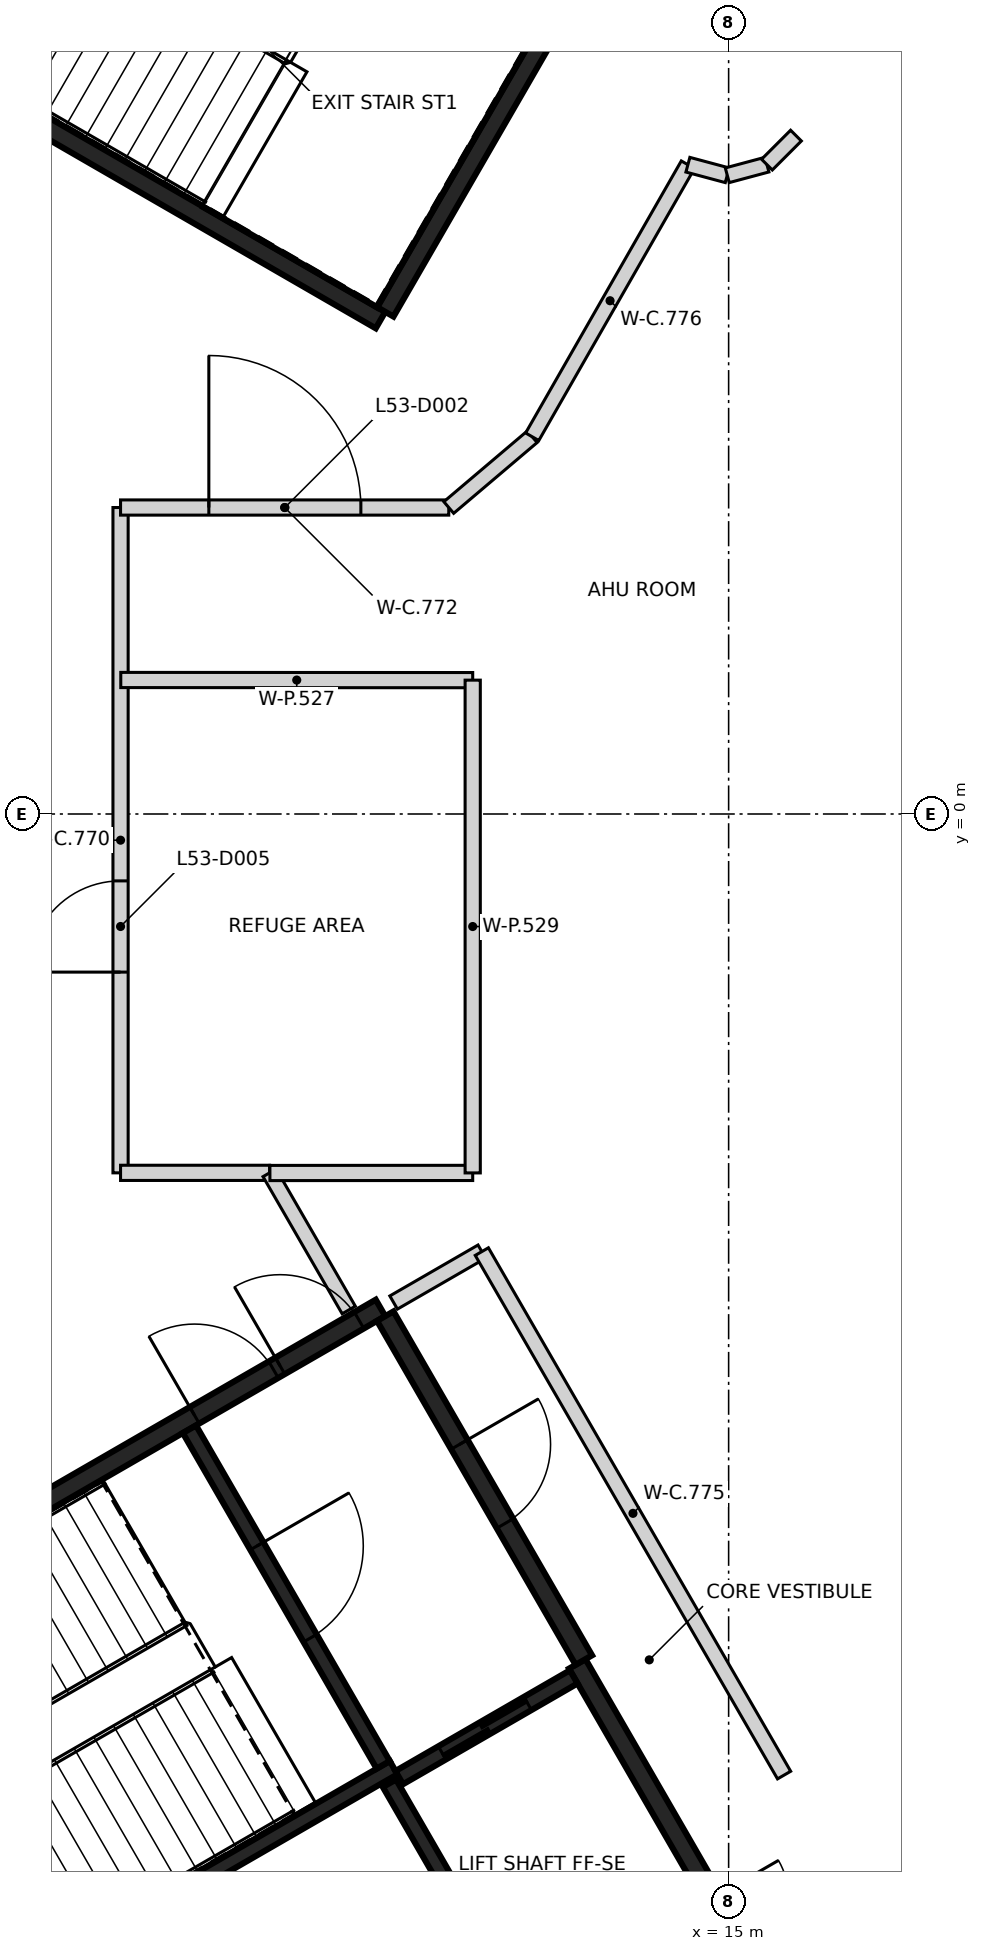
"""IFC4 building model, lengths in metres.
Left out: names, types, materials, properties, quantities, classifications, styles, units other than length and angle.
Written with IfcOpenShell. Run it as: python <this file> out.ifc"""

import sys

from ifc_helpers import new_model, si_unit, direction, frame, frame_2d, origin, place, context, subcontext, project, spatial, rectangle, extrude, element, fill, save


model = new_model("IFC4")
c1 = context("Model", 3, precision=1e-05, world=origin(), true_north=direction((0.0, 1.0)))
c2 = subcontext(c1, "Body", "Model", "MODEL_VIEW")
j1 = project(units=[si_unit("LENGTHUNIT", "METRE"), si_unit("PLANEANGLEUNIT", "RADIAN")], contexts=[c1])
p1 = place(None, origin())
s1 = spatial("IfcSite", under=j1, at=p1, CompositionType="ELEMENT")
p2 = place(p1, origin())
s2 = spatial("IfcBuilding", under=s1, at=p2, CompositionType="ELEMENT")
p3 = place(p2, frame((0.0, 0.0, 211.6)))
s3 = spatial("IfcBuildingStorey", under=s2, at=p3, CompositionType="ELEMENT", Elevation=211.6)
p4 = place(p3, frame((10.42, 6.498, 0.0), z_axis=(0.0, 0.0, 1.0), x_axis=(-0.866021906294, 0.500006057782, 0.0)))
e1 = element("IfcWall", 1, at=p4, inside=s3, PredefinedType="SHEAR", context=c2, shape_type="SweptSolid", body=[
    extrude(rectangle(XDim=11.55, YDim=0.25, at=frame_2d((5.775, 0.0))), origin(), (0.0, 0.0, 1.0), 4.45),
])
p5 = place(p4, frame((10.025, 0.0, 0.0)))
e2 = element("IfcOpeningElement", 2, at=p5, cuts=e1, PredefinedType="OPENING", context=c2, shape_type="SweptSolid", body=[
    extrude(rectangle(XDim=1.2, YDim=2.1, at=frame_2d((0.6, 1.05))), frame((0.0, 0.135, 0.0), z_axis=(0.0, -1.0, 0.0), x_axis=(1.0, 0.0, 0.0)), (0.0, 0.0, 1.0), 0.27),
])
p6 = place(p4, frame((8.725, 0.0, 0.0)))
e3 = element("IfcOpeningElement", 3, at=p6, cuts=e1, PredefinedType="OPENING", context=c2, shape_type="SweptSolid", body=[
    extrude(rectangle(XDim=1.2, YDim=2.1, at=frame_2d((0.6, 1.05))), frame((0.0, 0.135, 0.0), z_axis=(0.0, -1.0, 0.0), x_axis=(1.0, 0.0, 0.0)), (0.0, 0.0, 1.0), 0.27),
])
p7 = place(p3, frame((13.238, 11.378, 0.0), z_axis=(0.0, 0.0, 1.0), x_axis=(-0.500008851346, -0.866020293397, 0.0)))
e4 = element("IfcWall", 4, at=p7, inside=s3, PredefinedType="SHEAR", context=c2, shape_type="SweptSolid", body=[
    extrude(rectangle(XDim=5.51, YDim=0.25, at=frame_2d((2.755, 0.0))), origin(), (0.0, 0.0, 1.0), 4.45),
])
p8 = place(p3, frame((0.417, -12.273, 0.0), z_axis=(0.0, 0.0, 1.0), x_axis=(0.866021906294, 0.500006057782, 0.0)))
e5 = element("IfcWall", 5, at=p8, inside=s3, PredefinedType="SHEAR", context=c2, shape_type="SweptSolid", body=[
    extrude(rectangle(XDim=11.55, YDim=0.25, at=frame_2d((5.775, 0.0))), origin(), (0.0, 0.0, 1.0), 4.45),
])
p9 = place(p8, frame((10.025, 0.0, 0.0)))
e6 = element("IfcOpeningElement", 6, at=p9, cuts=e5, PredefinedType="OPENING", context=c2, shape_type="SweptSolid", body=[
    extrude(rectangle(XDim=1.2, YDim=2.1, at=frame_2d((0.6, 1.05))), frame((0.0, 0.135, 0.0), z_axis=(0.0, -1.0, 0.0), x_axis=(1.0, 0.0, 0.0)), (0.0, 0.0, 1.0), 0.27),
])
p10 = place(p8, frame((8.725, 0.0, 0.0)))
e7 = element("IfcOpeningElement", 7, at=p10, cuts=e5, PredefinedType="OPENING", context=c2, shape_type="SweptSolid", body=[
    extrude(rectangle(XDim=1.2, YDim=2.1, at=frame_2d((0.6, 1.05))), frame((0.0, 0.135, 0.0), z_axis=(0.0, -1.0, 0.0), x_axis=(1.0, 0.0, 0.0)), (0.0, 0.0, 1.0), 0.27),
])
p11 = place(p3, frame((13.008, -11.181, 0.0), z_axis=(0.0, 0.0, 1.0), x_axis=(0.500001955336, -0.866024274868, 0.0)))
e8 = element("IfcWall", 8, at=p11, inside=s3, PredefinedType="SHEAR", context=c2, shape_type="SweptSolid", body=[
    extrude(rectangle(XDim=6.125, YDim=0.25, at=frame_2d((3.062, 0.0))), origin(), (0.0, 0.0, 1.0), 4.45),
])
p12 = place(p11, frame((3.563, 0.0, 0.0)))
e9 = element("IfcOpeningElement", 9, at=p12, cuts=e8, PredefinedType="OPENING", context=c2, shape_type="SweptSolid", body=[
    extrude(rectangle(XDim=1.0, YDim=2.1, at=frame_2d((0.5, 1.05))), frame((0.0, 0.135, 0.0), z_axis=(0.0, -1.0, 0.0), x_axis=(1.0, 0.0, 0.0)), (0.0, 0.0, 1.0), 0.27),
])
p13 = place(p3, frame((10.483, -6.606, 0.0), z_axis=(0.0, 0.0, 1.0), x_axis=(0.49999885962, -0.866026062182, 0.0)))
e10 = element("IfcWall", 10, at=p13, inside=s3, PredefinedType="SHEAR", context=c2, shape_type="SweptSolid", body=[
    extrude(rectangle(XDim=5.225, YDim=0.25, at=frame_2d((2.612, 0.0))), origin(), (0.0, 0.0, 1.0), 4.45),
])
p14 = place(p13, frame((1.95, 0.0, 0.0)))
e11 = element("IfcOpeningElement", 11, at=p14, cuts=e10, PredefinedType="OPENING", context=c2, shape_type="SweptSolid", body=[
    extrude(rectangle(XDim=1.2, YDim=2.1, at=frame_2d((0.6, 1.05))), frame((0.0, 0.135, 0.0), z_axis=(0.0, -1.0, 0.0), x_axis=(1.0, 0.0, 0.0)), (0.0, 0.0, 1.0), 0.27),
])
p15 = place(p3, frame((5.419, -15.534, 0.0), z_axis=(0.0, 0.0, 1.0), x_axis=(0.866029065029, 0.499993658486, 0.0)))
e12 = element("IfcWall", 12, at=p15, inside=s3, PredefinedType="SHEAR", context=c2, shape_type="SweptSolid", body=[
    extrude(rectangle(XDim=5.974, YDim=0.2, at=frame_2d((2.987, 0.0))), origin(), (0.0, 0.0, 1.0), 4.45),
])
p16 = place(p3, frame((7.906, -8.094, 0.0), z_axis=(0.0, 0.0, 1.0), x_axis=(0.500027839223, -0.866009330205, 0.0)))
e13 = element("IfcWall", 13, at=p16, inside=s3, PredefinedType="SHEAR", context=c2, shape_type="SweptSolid", body=[
    extrude(rectangle(XDim=5.098, YDim=0.2, at=frame_2d((2.549, 0.0))), origin(), (0.0, 0.0, 1.0), 4.45),
])
p17 = place(p16, frame((1.774, 0.0, 0.0)))
e14 = element("IfcOpeningElement", 14, at=p17, cuts=e13, PredefinedType="OPENING", context=c2, shape_type="SweptSolid", body=[
    extrude(rectangle(XDim=1.4, YDim=2.1, at=frame_2d((0.7, 1.05))), frame((0.0, 0.11, 0.0), z_axis=(0.0, -1.0, 0.0), x_axis=(1.0, 0.0, 0.0)), (0.0, 0.0, 1.0), 0.22),
])
p18 = place(p3, frame((12.088, -15.437, 0.0), z_axis=(0.0, 0.0, 1.0), x_axis=(-0.500026960575, 0.86600983753, 0.0)))
e15 = element("IfcWall", 15, at=p18, inside=s3, PredefinedType="SHEAR", context=c2, shape_type="SweptSolid", body=[
    extrude(rectangle(XDim=3.1, YDim=0.2, at=frame_2d((1.55, 0.0))), origin(), (0.0, 0.0, 1.0), 4.45),
])
p19 = place(p3, frame((10.666, -12.678, 0.0), z_axis=(0.0, 0.0, 1.0), x_axis=(0.866018407898, 0.500012117035, 0.0)))
e16 = element("IfcWall", 16, at=p19, inside=s3, PredefinedType="SHEAR", context=c2, shape_type="SweptSolid", body=[
    extrude(rectangle(XDim=2.651, YDim=0.2, at=frame_2d((1.325, 0.0))), origin(), (0.0, 0.0, 1.0), 4.45),
])
p20 = place(p19, frame((0.652, 0.0, 0.0)))
e17 = element("IfcOpeningElement", 17, at=p20, cuts=e16, PredefinedType="OPENING", context=c2, shape_type="SweptSolid", body=[
    extrude(rectangle(XDim=1.3, YDim=2.1, at=frame_2d((0.65, 1.05))), frame((0.0, 0.11, 0.0), z_axis=(0.0, -1.0, 0.0), x_axis=(1.0, 0.0, 0.0)), (0.0, 0.0, 1.0), 0.22),
])
p21 = place(p3, frame((7.0, -4.721, 0.0), z_axis=(0.0, 0.0, 1.0), x_axis=(0.0, 1.0, 0.0)))
e18 = element("IfcWall", 18, at=p21, inside=s3, PredefinedType="PARTITIONING", context=c2, shape_type="SweptSolid", body=[
    extrude(rectangle(XDim=8.753, YDim=0.2, at=frame_2d((4.376, 0.0))), origin(), (0.0, 0.0, 1.0), 4.45),
])
p22 = place(p21, frame((2.641, 0.0, 0.0)))
e19 = element("IfcOpeningElement", 19, at=p22, cuts=e18, PredefinedType="OPENING", context=c2, shape_type="SweptSolid", body=[
    extrude(rectangle(XDim=1.2, YDim=2.1, at=frame_2d((0.6, 1.05))), frame((0.0, 0.11, 0.0), z_axis=(0.0, -1.0, 0.0), x_axis=(1.0, 0.0, 0.0)), (0.0, 0.0, 1.0), 0.22),
])
p23 = place(p3, frame((7.0, -4.721, 0.0), z_axis=(0.0, 0.0, 1.0), x_axis=(1.0, 0.0, 0.0)))
e20 = element("IfcWall", 20, at=p23, inside=s3, PredefinedType="PARTITIONING", context=c2, shape_type="SweptSolid", body=[
    extrude(rectangle(XDim=1.961, YDim=0.2, at=frame_2d((0.98, 0.0))), origin(), (0.0, 0.0, 1.0), 4.45),
])
p24 = place(p3, frame((7.0, 4.032, 0.0), z_axis=(0.0, 0.0, 1.0), x_axis=(1.0, 0.0, 0.0)))
e21 = element("IfcWall", 21, at=p24, inside=s3, PredefinedType="PARTITIONING", context=c2, shape_type="SweptSolid", body=[
    extrude(rectangle(XDim=4.318, YDim=0.2, at=frame_2d((2.159, 0.0))), origin(), (0.0, 0.0, 1.0), 4.45),
])
p25 = place(p24, frame((1.162, 0.0, 0.0)))
e22 = element("IfcOpeningElement", 22, at=p25, cuts=e21, PredefinedType="OPENING", context=c2, shape_type="SweptSolid", body=[
    extrude(rectangle(XDim=2.0, YDim=2.1, at=frame_2d((1.0, 1.05))), frame((0.0, 0.11, 0.0), z_axis=(0.0, -1.0, 0.0), x_axis=(1.0, 0.0, 0.0)), (0.0, 0.0, 1.0), 0.22),
])
p26 = place(p3, frame((8.961, -4.721, 0.0), z_axis=(0.0, 0.0, 1.0), x_axis=(0.499806992981, -0.866136807766, 0.0)))
e23 = element("IfcWall", 23, at=p26, inside=s3, PredefinedType="PARTITIONING", context=c2, shape_type="SweptSolid", body=[
    extrude(rectangle(XDim=2.083, YDim=0.2, at=frame_2d((1.042, 0.0))), origin(), (0.0, 0.0, 1.0), 4.45),
])
p27 = place(p3, frame((10.593, -6.427, 0.0), z_axis=(0.0, 0.0, 1.0), x_axis=(0.865912429188, 0.500195626709, 0.0)))
e24 = element("IfcWall", 24, at=p27, inside=s3, PredefinedType="PARTITIONING", context=c2, shape_type="SweptSolid", body=[
    extrude(rectangle(XDim=1.34, YDim=0.2, at=frame_2d((0.67, 0.0))), origin(), (0.0, 0.0, 1.0), 4.45),
])
p28 = place(p3, frame((11.318, 4.032, 0.0), z_axis=(0.0, 0.0, 1.0), x_axis=(0.762729681786, 0.646717428652, 0.0)))
e25 = element("IfcWall", 25, at=p28, inside=s3, PredefinedType="PARTITIONING", context=c2, shape_type="SweptSolid", body=[
    extrude(rectangle(XDim=1.439, YDim=0.2, at=frame_2d((0.72, 0.0))), origin(), (0.0, 0.0, 1.0), 4.45),
])
p29 = place(p3, frame((11.753, -5.757, 0.0), z_axis=(0.0, 0.0, 1.0), x_axis=(0.500058164282, -0.865991820016, 0.0)))
e26 = element("IfcWall", 26, at=p29, inside=s3, PredefinedType="PARTITIONING", context=c2, shape_type="SweptSolid", body=[
    extrude(rectangle(XDim=7.953, YDim=0.2, at=frame_2d((3.976, 0.0))), origin(), (0.0, 0.0, 1.0), 4.45),
])
p30 = place(p3, frame((12.416, 4.963, 0.0), z_axis=(0.0, 0.0, 1.0), x_axis=(0.496668044938, 0.867940581571, 0.0)))
e27 = element("IfcWall", 27, at=p30, inside=s3, PredefinedType="PARTITIONING", context=c2, shape_type="SweptSolid", body=[
    extrude(rectangle(XDim=4.124, YDim=0.2, at=frame_2d((2.062, 0.0))), origin(), (0.0, 0.0, 1.0), 4.45),
])
p31 = place(p3, frame((14.464, 8.542, 0.0), z_axis=(0.0, 0.0, 1.0), x_axis=(0.965848396518, -0.259107844233, 0.0)))
e28 = element("IfcWall", 28, at=p31, inside=s3, PredefinedType="PARTITIONING", context=c2, shape_type="SweptSolid", body=[
    extrude(rectangle(XDim=0.536, YDim=0.2, at=frame_2d((0.268, 0.0))), origin(), (0.0, 0.0, 1.0), 4.45),
])
for number, where, z_axis, x_axis in (
    (29, (14.982, 8.403, 0.0), (0.0, 0.0, 1.0), (0.966, 0.259, 0.0)),
    (30, (15.504, 8.543, 0.0), (0.0, 0.0, 1.0), (0.707, 0.707, 0.0)),
):
    element("IfcWall", number, at=place(p3, frame(where, z_axis=z_axis, x_axis=x_axis)), inside=s3, PredefinedType="PARTITIONING", context=c2, shape_type="SweptSolid", body=[
        extrude(rectangle(XDim=0.54, YDim=0.2, at=frame_2d((0.27, 0.0))), origin(), (0.0, 0.0, 1.0), 4.45),
    ])
p32 = place(p3, frame((7.003, 1.763, 0.0), z_axis=(0.0, 0.0, 1.0), x_axis=(0.99999991103, -0.000421829649, 0.0)))
e31 = element("IfcWall", 31, at=p32, inside=s3, PredefinedType="PARTITIONING", context=c2, shape_type="SweptSolid", body=[
    extrude(rectangle(XDim=4.63, YDim=0.2, at=frame_2d((2.315, 0.0))), origin(), (0.0, 0.0, 1.0), 4.45),
])
p33 = place(p3, frame((8.965, -4.723, 0.0), z_axis=(0.0, 0.0, 1.0), x_axis=(0.99999993301, 0.000366032186, 0.0)))
e32 = element("IfcWall", 32, at=p33, inside=s3, PredefinedType="PARTITIONING", context=c2, shape_type="SweptSolid", body=[
    extrude(rectangle(XDim=2.668, YDim=0.2, at=frame_2d((1.334, 0.0))), origin(), (0.0, 0.0, 1.0), 4.45),
])
p34 = place(p3, frame((11.633, -4.722, 0.0), z_axis=(0.0, 0.0, 1.0), x_axis=(0.0, 1.0, 0.0)))
e33 = element("IfcWall", 33, at=p34, inside=s3, PredefinedType="PARTITIONING", context=c2, shape_type="SweptSolid", body=[
    extrude(rectangle(XDim=6.483, YDim=0.2, at=frame_2d((3.241, 0.0))), origin(), (0.0, 0.0, 1.0), 4.45),
])
p35 = place(p20, origin())
e34 = element("IfcDoor", 34, at=p35, inside=s3, OperationType="SLIDING_TO_RIGHT", PredefinedType="DOOR", context=c2, shape_type="SweptSolid", body=[
    extrude(rectangle(XDim=1.3, YDim=2.1, at=frame_2d((0.65, 1.05))), frame((0.0, 0.025, 0.0), z_axis=(0.0, -1.0, 0.0), x_axis=(1.0, 0.0, 0.0)), (0.0, 0.0, 1.0), 0.05),
])
fill(e17, e34)
p36 = place(p9, origin())
e35 = element("IfcDoor", 35, at=p36, inside=s3, OperationType="SINGLE_SWING_LEFT", PredefinedType="DOOR", context=c2, shape_type="SweptSolid", body=[
    extrude(rectangle(XDim=1.2, YDim=2.1, at=frame_2d((0.6, 1.05))), frame((0.0, 0.025, 0.0), z_axis=(0.0, -1.0, 0.0), x_axis=(1.0, 0.0, 0.0)), (0.0, 0.0, 1.0), 0.05),
])
fill(e6, e35)
p37 = place(p10, origin())
e36 = element("IfcDoor", 36, at=p37, inside=s3, OperationType="SINGLE_SWING_RIGHT", PredefinedType="DOOR", context=c2, shape_type="SweptSolid", body=[
    extrude(rectangle(XDim=1.2, YDim=2.1, at=frame_2d((0.6, 1.05))), frame((0.0, 0.025, 0.0), z_axis=(0.0, -1.0, 0.0), x_axis=(1.0, 0.0, 0.0)), (0.0, 0.0, 1.0), 0.05),
])
fill(e7, e36)
p38 = place(p17, origin())
e37 = element("IfcDoor", 37, at=p38, inside=s3, OperationType="SINGLE_SWING_RIGHT", PredefinedType="DOOR", context=c2, shape_type="SweptSolid", body=[
    extrude(rectangle(XDim=1.4, YDim=2.1, at=frame_2d((0.7, 1.05))), frame((0.0, 0.025, 0.0), z_axis=(0.0, -1.0, 0.0), x_axis=(1.0, 0.0, 0.0)), (0.0, 0.0, 1.0), 0.05),
])
fill(e14, e37)
p39 = place(p14, origin())
e38 = element("IfcDoor", 38, at=p39, inside=s3, OperationType="SINGLE_SWING_LEFT", PredefinedType="DOOR", context=c2, shape_type="SweptSolid", body=[
    extrude(rectangle(XDim=1.2, YDim=2.1, at=frame_2d((0.6, 1.05))), frame((0.0, 0.025, 0.0), z_axis=(0.0, -1.0, 0.0), x_axis=(1.0, 0.0, 0.0)), (0.0, 0.0, 1.0), 0.05),
])
fill(e11, e38)
p40 = place(p25, frame((2.0, 0.0, 0.0), z_axis=(0.0, 0.0, 1.0), x_axis=(-1.0, 0.0, 0.0)))
e39 = element("IfcDoor", 39, at=p40, inside=s3, OperationType="DOUBLE_DOOR_SINGLE_SWING", PredefinedType="DOOR", context=c2, shape_type="SweptSolid", body=[
    extrude(rectangle(XDim=2.0, YDim=2.1, at=frame_2d((1.0, 1.05))), frame((0.0, 0.025, 0.0), z_axis=(0.0, -1.0, 0.0), x_axis=(1.0, 0.0, 0.0)), (0.0, 0.0, 1.0), 0.05),
])
fill(e22, e39)
p41 = place(p22, frame((1.2, 0.0, 0.0), z_axis=(0.0, 0.0, 1.0), x_axis=(-1.0, 0.0, 0.0)))
e40 = element("IfcDoor", 40, at=p41, inside=s3, OperationType="SINGLE_SWING_LEFT", PredefinedType="DOOR", context=c2, shape_type="SweptSolid", body=[
    extrude(rectangle(XDim=1.2, YDim=2.1, at=frame_2d((0.6, 1.05))), frame((0.0, 0.025, 0.0), z_axis=(0.0, -1.0, 0.0), x_axis=(1.0, 0.0, 0.0)), (0.0, 0.0, 1.0), 0.05),
])
fill(e19, e40)
save(model, sys.argv[1])
